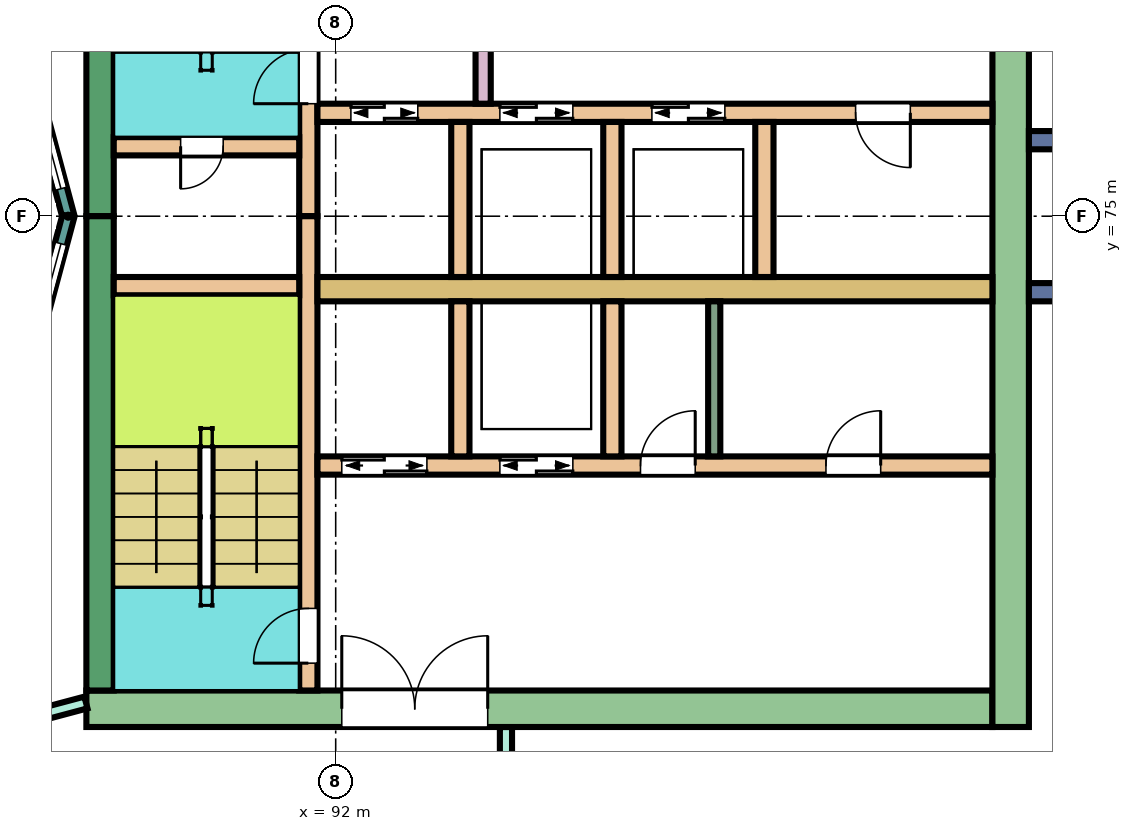
"""IFC4 building model, lengths in metres.
Left out: names, types, materials, properties, quantities, classifications, styles, units other than length and angle.
Written with IfcOpenShell. Run it as: python <this file> out.ifc"""

import sys

from ifc_helpers import new_model, si_unit, direction, frame, frame_2d, origin, place, context, subcontext, project, spatial, rectangle, extrude, element, fill, save


model = new_model("IFC4")
c1 = context("Model", 3, precision=1e-05, world=origin(), true_north=direction((0.0, 1.0)))
c2 = subcontext(c1, "Body", "Model", "MODEL_VIEW")
j1 = project(units=[si_unit("LENGTHUNIT", "METRE"), si_unit("PLANEANGLEUNIT", "RADIAN")], contexts=[c1])
p1 = place(None, origin())
s1 = spatial("IfcSite", under=j1, at=p1, CompositionType="ELEMENT")
p2 = place(p1, origin())
s2 = spatial("IfcBuilding", under=s1, at=p2, CompositionType="ELEMENT")
p3 = place(p2, frame((0.0, 0.0, 270.9)))
s3 = spatial("IfcBuildingStorey", under=s2, at=p3, CompositionType="ELEMENT", Elevation=270.9)
p4 = place(p3, frame((87.9, 66.9, 0.0), z_axis=(0.0, 0.0, 1.0), x_axis=(1.0, 0.0, 0.0)))
e1 = element("IfcWall", 1, at=p4, inside=s3, PredefinedType="SHEAR", context=c2, shape_type="SweptSolid", body=[
    extrude(rectangle(XDim=14.9, YDim=0.6, at=frame_2d((7.45, 0.0))), origin(), (0.0, 0.0, 1.0), 4.48),
])
p5 = place(p4, frame((4.2, 0.0, 0.0)))
e2 = element("IfcOpeningElement", 2, at=p5, cuts=e1, PredefinedType="OPENING", context=c2, shape_type="SweptSolid", body=[
    extrude(rectangle(XDim=2.4, YDim=2.4, at=frame_2d((1.2, 1.2))), frame((0.0, 0.31, 0.0), z_axis=(0.0, -1.0, 0.0), x_axis=(1.0, 0.0, 0.0)), (0.0, 0.0, 1.0), 0.62),
])
for number, where, z_axis, x_axis in (
    (3, (88.125, 75.0, 0.0), (0.0, 0.0, 1.0), (0.0, 1.0, 0.0)),
    (4, (88.125, 67.2, 0.0), (0.0, 0.0, 1.0), (0.0, 1.0, 0.0)),
):
    element("IfcWall", number, at=place(p3, frame(where, z_axis=z_axis, x_axis=x_axis)), inside=s3, PredefinedType="SHEAR", context=c2, shape_type="SweptSolid", body=[
        extrude(rectangle(XDim=7.8, YDim=0.45, at=frame_2d((3.9, 0.0))), origin(), (0.0, 0.0, 1.0), 4.48),
    ])
p6 = place(p3, frame((103.1, 66.6, 0.0), z_axis=(0.0, 0.0, 1.0), x_axis=(0.0, 1.0, 0.0)))
e5 = element("IfcWall", 5, at=p6, inside=s3, PredefinedType="SHEAR", context=c2, shape_type="SweptSolid", body=[
    extrude(rectangle(XDim=16.8, YDim=0.6, at=frame_2d((8.4, 0.0))), origin(), (0.0, 0.0, 1.0), 4.48),
])
p7 = place(p3, frame((91.55, 75.0, 0.0), z_axis=(0.0, 0.0, 1.0), x_axis=(0.0, 1.0, 0.0)))
e6 = element("IfcWall", 6, at=p7, inside=s3, PredefinedType="SHEAR", context=c2, shape_type="SweptSolid", body=[
    extrude(rectangle(XDim=7.8, YDim=0.3, at=frame_2d((3.9, 0.0))), origin(), (0.0, 0.0, 1.0), 4.48),
])
p8 = place(p7, frame((1.85, 0.0, 0.0)))
e7 = element("IfcOpeningElement", 7, at=p8, cuts=e6, PredefinedType="OPENING", context=c2, shape_type="SweptSolid", body=[
    extrude(rectangle(XDim=0.9, YDim=2.1, at=frame_2d((0.45, 1.05))), frame((0.0, 0.16, 0.0), z_axis=(0.0, -1.0, 0.0), x_axis=(1.0, 0.0, 0.0)), (0.0, 0.0, 1.0), 0.32),
])
p9 = place(p3, frame((91.55, 67.2, 0.0), z_axis=(0.0, 0.0, 1.0), x_axis=(0.0, 1.0, 0.0)))
e8 = element("IfcWall", 8, at=p9, inside=s3, PredefinedType="SHEAR", context=c2, shape_type="SweptSolid", body=[
    extrude(rectangle(XDim=7.8, YDim=0.3, at=frame_2d((3.9, 0.0))), origin(), (0.0, 0.0, 1.0), 4.48),
])
p10 = place(p9, frame((0.45, 0.0, 0.0)))
e9 = element("IfcOpeningElement", 9, at=p10, cuts=e8, PredefinedType="OPENING", context=c2, shape_type="SweptSolid", body=[
    extrude(rectangle(XDim=0.9, YDim=2.1, at=frame_2d((0.45, 1.05))), frame((0.0, 0.16, 0.0), z_axis=(0.0, -1.0, 0.0), x_axis=(1.0, 0.0, 0.0)), (0.0, 0.0, 1.0), 0.32),
])
p11 = place(p3, frame((88.35, 76.15, 0.0), z_axis=(0.0, 0.0, 1.0), x_axis=(1.0, 0.0, 0.0)))
e10 = element("IfcWall", 10, at=p11, inside=s3, PredefinedType="SHEAR", context=c2, shape_type="SweptSolid", body=[
    extrude(rectangle(XDim=3.05, YDim=0.3, at=frame_2d((1.525, 0.0))), origin(), (0.0, 0.0, 1.0), 4.48),
])
p12 = place(p11, frame((1.1, 0.0, 0.0)))
e11 = element("IfcOpeningElement", 11, at=p12, cuts=e10, PredefinedType="OPENING", context=c2, shape_type="SweptSolid", body=[
    extrude(rectangle(XDim=0.7, YDim=2.0, at=frame_2d((0.35, 1.0))), frame((0.0, 0.16, 0.0), z_axis=(0.0, -1.0, 0.0), x_axis=(1.0, 0.0, 0.0)), (0.0, 0.0, 1.0), 0.32),
])
p13 = place(p3, frame((88.35, 73.85, 0.0), z_axis=(0.0, 0.0, 1.0), x_axis=(1.0, 0.0, 0.0)))
e12 = element("IfcWall", 12, at=p13, inside=s3, PredefinedType="SHEAR", context=c2, shape_type="SweptSolid", body=[
    extrude(rectangle(XDim=3.05, YDim=0.3, at=frame_2d((1.525, 0.0))), origin(), (0.0, 0.0, 1.0), 4.48),
])
p14 = place(p3, frame((91.7, 76.7, 0.0), z_axis=(0.0, 0.0, 1.0), x_axis=(1.0, 0.0, 0.0)))
e13 = element("IfcWall", 13, at=p14, inside=s3, PredefinedType="SHEAR", context=c2, shape_type="SweptSolid", body=[
    extrude(rectangle(XDim=11.1, YDim=0.3, at=frame_2d((5.55, 0.0))), origin(), (0.0, 0.0, 1.0), 4.48),
])
p15 = place(p14, frame((0.55, 0.0, 0.0)))
e14 = element("IfcOpeningElement", 14, at=p15, cuts=e13, PredefinedType="OPENING", context=c2, shape_type="SweptSolid", body=[
    extrude(rectangle(XDim=1.1, YDim=2.1, at=frame_2d((0.55, 1.05))), frame((0.0, 0.16, 0.0), z_axis=(0.0, -1.0, 0.0), x_axis=(1.0, 0.0, 0.0)), (0.0, 0.0, 1.0), 0.32),
])
p16 = place(p14, frame((3.0, 0.0, 0.0)))
e15 = element("IfcOpeningElement", 15, at=p16, cuts=e13, PredefinedType="OPENING", context=c2, shape_type="SweptSolid", body=[
    extrude(rectangle(XDim=1.2, YDim=2.1, at=frame_2d((0.6, 1.05))), frame((0.0, 0.16, 0.0), z_axis=(0.0, -1.0, 0.0), x_axis=(1.0, 0.0, 0.0)), (0.0, 0.0, 1.0), 0.32),
])
p17 = place(p14, frame((5.5, 0.0, 0.0)))
e16 = element("IfcOpeningElement", 16, at=p17, cuts=e13, PredefinedType="OPENING", context=c2, shape_type="SweptSolid", body=[
    extrude(rectangle(XDim=1.2, YDim=2.1, at=frame_2d((0.6, 1.05))), frame((0.0, 0.16, 0.0), z_axis=(0.0, -1.0, 0.0), x_axis=(1.0, 0.0, 0.0)), (0.0, 0.0, 1.0), 0.32),
])
p18 = place(p14, frame((8.85, 0.0, 0.0)))
e17 = element("IfcOpeningElement", 17, at=p18, cuts=e13, PredefinedType="OPENING", context=c2, shape_type="SweptSolid", body=[
    extrude(rectangle(XDim=0.9, YDim=2.1, at=frame_2d((0.45, 1.05))), frame((0.0, 0.16, 0.0), z_axis=(0.0, -1.0, 0.0), x_axis=(1.0, 0.0, 0.0)), (0.0, 0.0, 1.0), 0.32),
])
p19 = place(p3, frame((91.7, 73.8, 0.0), z_axis=(0.0, 0.0, 1.0), x_axis=(1.0, 0.0, 0.0)))
e18 = element("IfcWall", 18, at=p19, inside=s3, PredefinedType="SHEAR", context=c2, shape_type="SweptSolid", body=[
    extrude(rectangle(XDim=11.1, YDim=0.4, at=frame_2d((5.55, 0.0))), origin(), (0.0, 0.0, 1.0), 4.48),
])
p20 = place(p3, frame((91.7, 70.9, 0.0), z_axis=(0.0, 0.0, 1.0), x_axis=(1.0, 0.0, 0.0)))
e19 = element("IfcWall", 19, at=p20, inside=s3, PredefinedType="SHEAR", context=c2, shape_type="SweptSolid", body=[
    extrude(rectangle(XDim=11.1, YDim=0.3, at=frame_2d((5.55, 0.0))), origin(), (0.0, 0.0, 1.0), 4.48),
])
p21 = place(p20, frame((0.4, 0.0, 0.0)))
e20 = element("IfcOpeningElement", 20, at=p21, cuts=e19, PredefinedType="OPENING", context=c2, shape_type="SweptSolid", body=[
    extrude(rectangle(XDim=1.4, YDim=2.1, at=frame_2d((0.7, 1.05))), frame((0.0, 0.16, 0.0), z_axis=(0.0, -1.0, 0.0), x_axis=(1.0, 0.0, 0.0)), (0.0, 0.0, 1.0), 0.32),
])
p22 = place(p20, frame((3.0, 0.0, 0.0)))
e21 = element("IfcOpeningElement", 21, at=p22, cuts=e19, PredefinedType="OPENING", context=c2, shape_type="SweptSolid", body=[
    extrude(rectangle(XDim=1.2, YDim=2.1, at=frame_2d((0.6, 1.05))), frame((0.0, 0.16, 0.0), z_axis=(0.0, -1.0, 0.0), x_axis=(1.0, 0.0, 0.0)), (0.0, 0.0, 1.0), 0.32),
])
p23 = place(p20, frame((5.312, 0.0, 0.0)))
e22 = element("IfcOpeningElement", 22, at=p23, cuts=e19, PredefinedType="OPENING", context=c2, shape_type="SweptSolid", body=[
    extrude(rectangle(XDim=0.9, YDim=2.1, at=frame_2d((0.45, 1.05))), frame((0.0, 0.16, 0.0), z_axis=(0.0, -1.0, 0.0), x_axis=(1.0, 0.0, 0.0)), (0.0, 0.0, 1.0), 0.32),
])
p24 = place(p20, frame((8.363, 0.0, 0.0)))
e23 = element("IfcOpeningElement", 23, at=p24, cuts=e19, PredefinedType="OPENING", context=c2, shape_type="SweptSolid", body=[
    extrude(rectangle(XDim=0.9, YDim=2.1, at=frame_2d((0.45, 1.05))), frame((0.0, 0.16, 0.0), z_axis=(0.0, -1.0, 0.0), x_axis=(1.0, 0.0, 0.0)), (0.0, 0.0, 1.0), 0.32),
])
for number, where, z_axis, x_axis in (
    (24, (94.05, 74.0, 0.0), (0.0, 0.0, 1.0), (0.0, 1.0, 0.0)),
    (25, (96.55, 74.0, 0.0), (0.0, 0.0, 1.0), (0.0, 1.0, 0.0)),
    (26, (99.05, 74.0, 0.0), (0.0, 0.0, 1.0), (0.0, 1.0, 0.0)),
    (27, (94.05, 71.05, 0.0), (0.0, 0.0, 1.0), (0.0, 1.0, 0.0)),
    (28, (96.55, 71.05, 0.0), (0.0, 0.0, 1.0), (0.0, 1.0, 0.0)),
):
    element("IfcWall", number, at=place(p3, frame(where, z_axis=z_axis, x_axis=x_axis)), inside=s3, PredefinedType="SHEAR", context=c2, shape_type="SweptSolid", body=[
        extrude(rectangle(XDim=2.55, YDim=0.3, at=frame_2d((1.275, 0.0))), origin(), (0.0, 0.0, 1.0), 4.48),
    ])
p25 = place(p3, frame((94.425, 76.85, 0.0), z_axis=(0.0, 0.0, 1.0), x_axis=(0.0, 1.0, 0.0)))
e29 = element("IfcWall", 29, at=p25, inside=s3, PredefinedType="SHEAR", context=c2, shape_type="SweptSolid", body=[
    extrude(rectangle(XDim=1.5, YDim=0.25, at=frame_2d((0.75, 0.0))), origin(), (0.0, 0.0, 1.0), 4.48),
])
for number, where, z_axis, x_axis in (
    (30, (103.4, 73.75, 0.0), (0.0, 0.0, 1.0), (1.0, 0.0, 0.0)),
    (31, (103.4, 76.25, 0.0), (0.0, 0.0, 1.0), (1.0, 0.0, 0.0)),
):
    element("IfcWall", number, at=place(p3, frame(where, z_axis=z_axis, x_axis=x_axis)), inside=s3, PredefinedType="NOTDEFINED", context=c2, shape_type="SweptSolid", body=[
        extrude(rectangle(XDim=2.416, YDim=0.3, at=frame_2d((1.208, 0.0))), origin(), (0.0, 0.0, 1.0), 4.8),
    ])
p26 = place(p3, frame((87.604, 75.0, 0.0), z_axis=(0.0, 0.0, 1.0), x_axis=(-0.258789828301, 0.965933654434, 0.0)))
e32 = element("IfcWall", 32, at=p26, inside=s3, PredefinedType="NOTDEFINED", context=c2, shape_type="SweptSolid", body=[
    extrude(rectangle(XDim=3.936, YDim=0.2, at=frame_2d((1.968, 0.0))), origin(), (0.0, 0.0, 1.0), 4.8),
])
p27 = place(p26, frame((0.468, 0.0, 0.9)))
e33 = element("IfcOpeningElement", 33, at=p27, cuts=e32, PredefinedType="OPENING", context=c2, shape_type="SweptSolid", body=[
    extrude(rectangle(XDim=3.0, YDim=2.3, at=frame_2d((1.5, 1.15))), frame((0.0, 0.11, 0.0), z_axis=(0.0, -1.0, 0.0), x_axis=(1.0, 0.0, 0.0)), (0.0, 0.0, 1.0), 0.22),
])
p28 = place(p3, frame((86.585, 71.198, 0.0), z_axis=(0.0, 0.0, 1.0), x_axis=(0.258789828301, 0.965933654434, 0.0)))
e34 = element("IfcWall", 34, at=p28, inside=s3, PredefinedType="NOTDEFINED", context=c2, shape_type="SweptSolid", body=[
    extrude(rectangle(XDim=3.936, YDim=0.2, at=frame_2d((1.968, 0.0))), origin(), (0.0, 0.0, 1.0), 4.8),
])
p29 = place(p28, frame((0.468, 0.0, 0.9)))
e35 = element("IfcOpeningElement", 35, at=p29, cuts=e34, PredefinedType="OPENING", context=c2, shape_type="SweptSolid", body=[
    extrude(rectangle(XDim=3.0, YDim=2.3, at=frame_2d((1.5, 1.15))), frame((0.0, 0.11, 0.0), z_axis=(0.0, -1.0, 0.0), x_axis=(1.0, 0.0, 0.0)), (0.0, 0.0, 1.0), 0.22),
])
p30 = place(p3, frame((80.125, 64.932, 0.0), z_axis=(0.0, 0.0, 1.0), x_axis=(0.966236955806, 0.257655089674, 0.0)))
e36 = element("IfcWall", 36, at=p30, inside=s3, PredefinedType="PARTITIONING", context=c2, shape_type="SweptSolid", body=[
    extrude(rectangle(XDim=8.039, YDim=0.2, at=frame_2d((4.02, 0.0))), origin(), (0.0, 0.0, 1.0), 4.35),
])
p31 = place(p30, frame((6.298, 0.0, 0.0)))
e37 = element("IfcOpeningElement", 37, at=p31, cuts=e36, PredefinedType="OPENING", context=c2, shape_type="SweptSolid", body=[
    extrude(rectangle(XDim=0.9, YDim=2.1, at=frame_2d((0.45, 1.05))), frame((0.0, 0.11, 0.0), z_axis=(0.0, -1.0, 0.0), x_axis=(1.0, 0.0, 0.0)), (0.0, 0.0, 1.0), 0.22),
])
p32 = place(p30, frame((2.045, 0.0, 0.0)))
e38 = element("IfcOpeningElement", 38, at=p32, cuts=e36, PredefinedType="OPENING", context=c2, shape_type="SweptSolid", body=[
    extrude(rectangle(XDim=0.9, YDim=2.1, at=frame_2d((0.45, 1.05))), frame((0.0, 0.11, 0.0), z_axis=(0.0, -1.0, 0.0), x_axis=(1.0, 0.0, 0.0)), (0.0, 0.0, 1.0), 0.22),
])
p33 = place(p3, frame((94.8, 65.1, 0.0), z_axis=(0.0, 0.0, 1.0), x_axis=(0.0, 1.0, 0.0)))
e39 = element("IfcWall", 39, at=p33, inside=s3, PredefinedType="PARTITIONING", context=c2, shape_type="SweptSolid", body=[
    extrude(rectangle(XDim=1.499, YDim=0.2, at=frame_2d((0.75, 0.0))), origin(), (0.0, 0.0, 1.0), 4.35),
])
p34 = place(p3, frame((98.225, 71.05, 0.0), z_axis=(0.0, 0.0, 1.0), x_axis=(0.0, 1.0, 0.0)))
e40 = element("IfcWall", 40, at=p34, inside=s3, PredefinedType="PARTITIONING", context=c2, shape_type="SweptSolid", body=[
    extrude(rectangle(XDim=2.55, YDim=0.2, at=frame_2d((1.275, 0.0))), origin(), (0.0, 0.0, 1.0), 4.48),
])
p35 = place(p27, origin())
e41 = element("IfcWindow", 41, at=p35, inside=s3, PartitioningType="SINGLE_PANEL", PredefinedType="WINDOW", context=c2, shape_type="SweptSolid", body=[
    extrude(rectangle(XDim=3.0, YDim=2.3, at=frame_2d((1.5, 1.15))), frame((0.0, 0.03, 0.0), z_axis=(0.0, -1.0, 0.0), x_axis=(1.0, 0.0, 0.0)), (0.0, 0.0, 1.0), 0.06),
])
fill(e33, e41)
p36 = place(p29, origin())
e42 = element("IfcWindow", 42, at=p36, inside=s3, PartitioningType="SINGLE_PANEL", PredefinedType="WINDOW", context=c2, shape_type="SweptSolid", body=[
    extrude(rectangle(XDim=3.0, YDim=2.3, at=frame_2d((1.5, 1.15))), frame((0.0, 0.03, 0.0), z_axis=(0.0, -1.0, 0.0), x_axis=(1.0, 0.0, 0.0)), (0.0, 0.0, 1.0), 0.06),
])
fill(e35, e42)
p37 = place(p12, frame((0.7, 0.0, 0.0), z_axis=(0.0, 0.0, 1.0), x_axis=(-1.0, 0.0, 0.0)))
e43 = element("IfcDoor", 43, at=p37, inside=s3, OperationType="SINGLE_SWING_RIGHT", PredefinedType="DOOR", context=c2, shape_type="SweptSolid", body=[
    extrude(rectangle(XDim=0.7, YDim=2.0, at=frame_2d((0.35, 1.0))), frame((0.0, 0.025, 0.0), z_axis=(0.0, -1.0, 0.0), x_axis=(1.0, 0.0, 0.0)), (0.0, 0.0, 1.0), 0.05),
])
fill(e11, e43)
p38 = place(p8, origin())
e44 = element("IfcDoor", 44, at=p38, inside=s3, OperationType="SINGLE_SWING_LEFT", PredefinedType="DOOR", context=c2, shape_type="SweptSolid", body=[
    extrude(rectangle(XDim=0.9, YDim=2.1, at=frame_2d((0.45, 1.05))), frame((0.0, 0.025, 0.0), z_axis=(0.0, -1.0, 0.0), x_axis=(1.0, 0.0, 0.0)), (0.0, 0.0, 1.0), 0.05),
])
fill(e7, e44)
p39 = place(p10, origin())
e45 = element("IfcDoor", 45, at=p39, inside=s3, OperationType="SINGLE_SWING_LEFT", PredefinedType="DOOR", context=c2, shape_type="SweptSolid", body=[
    extrude(rectangle(XDim=0.9, YDim=2.1, at=frame_2d((0.45, 1.05))), frame((0.0, 0.025, 0.0), z_axis=(0.0, -1.0, 0.0), x_axis=(1.0, 0.0, 0.0)), (0.0, 0.0, 1.0), 0.05),
])
fill(e9, e45)
p40 = place(p15, origin())
e46 = element("IfcDoor", 46, at=p40, inside=s3, OperationType="DOUBLE_DOOR_SLIDING", PredefinedType="DOOR", context=c2, shape_type="SweptSolid", body=[
    extrude(rectangle(XDim=1.1, YDim=2.1, at=frame_2d((0.55, 1.05))), frame((0.0, 0.025, 0.0), z_axis=(0.0, -1.0, 0.0), x_axis=(1.0, 0.0, 0.0)), (0.0, 0.0, 1.0), 0.05),
])
fill(e14, e46)
p41 = place(p16, origin())
e47 = element("IfcDoor", 47, at=p41, inside=s3, OperationType="DOUBLE_DOOR_SLIDING", PredefinedType="DOOR", context=c2, shape_type="SweptSolid", body=[
    extrude(rectangle(XDim=1.2, YDim=2.1, at=frame_2d((0.6, 1.05))), frame((0.0, 0.025, 0.0), z_axis=(0.0, -1.0, 0.0), x_axis=(1.0, 0.0, 0.0)), (0.0, 0.0, 1.0), 0.05),
])
fill(e15, e47)
p42 = place(p17, origin())
e48 = element("IfcDoor", 48, at=p42, inside=s3, OperationType="DOUBLE_DOOR_SLIDING", PredefinedType="DOOR", context=c2, shape_type="SweptSolid", body=[
    extrude(rectangle(XDim=1.2, YDim=2.1, at=frame_2d((0.6, 1.05))), frame((0.0, 0.025, 0.0), z_axis=(0.0, -1.0, 0.0), x_axis=(1.0, 0.0, 0.0)), (0.0, 0.0, 1.0), 0.05),
])
fill(e16, e48)
p43 = place(p18, frame((0.9, 0.0, 0.0), z_axis=(0.0, 0.0, 1.0), x_axis=(-1.0, 0.0, 0.0)))
e49 = element("IfcDoor", 49, at=p43, inside=s3, OperationType="SINGLE_SWING_LEFT", PredefinedType="DOOR", context=c2, shape_type="SweptSolid", body=[
    extrude(rectangle(XDim=0.9, YDim=2.1, at=frame_2d((0.45, 1.05))), frame((0.0, 0.025, 0.0), z_axis=(0.0, -1.0, 0.0), x_axis=(1.0, 0.0, 0.0)), (0.0, 0.0, 1.0), 0.05),
])
fill(e17, e49)
p44 = place(p21, origin())
e50 = element("IfcDoor", 50, at=p44, inside=s3, OperationType="DOUBLE_DOOR_SLIDING", PredefinedType="DOOR", context=c2, shape_type="SweptSolid", body=[
    extrude(rectangle(XDim=1.4, YDim=2.1, at=frame_2d((0.7, 1.05))), frame((0.0, 0.025, 0.0), z_axis=(0.0, -1.0, 0.0), x_axis=(1.0, 0.0, 0.0)), (0.0, 0.0, 1.0), 0.05),
])
fill(e20, e50)
p45 = place(p22, origin())
e51 = element("IfcDoor", 51, at=p45, inside=s3, OperationType="DOUBLE_DOOR_SLIDING", PredefinedType="DOOR", context=c2, shape_type="SweptSolid", body=[
    extrude(rectangle(XDim=1.2, YDim=2.1, at=frame_2d((0.6, 1.05))), frame((0.0, 0.025, 0.0), z_axis=(0.0, -1.0, 0.0), x_axis=(1.0, 0.0, 0.0)), (0.0, 0.0, 1.0), 0.05),
])
fill(e21, e51)
p46 = place(p23, origin())
e52 = element("IfcDoor", 52, at=p46, inside=s3, OperationType="SINGLE_SWING_RIGHT", PredefinedType="DOOR", context=c2, shape_type="SweptSolid", body=[
    extrude(rectangle(XDim=0.9, YDim=2.1, at=frame_2d((0.45, 1.05))), frame((0.0, 0.025, 0.0), z_axis=(0.0, -1.0, 0.0), x_axis=(1.0, 0.0, 0.0)), (0.0, 0.0, 1.0), 0.05),
])
fill(e22, e52)
p47 = place(p24, origin())
e53 = element("IfcDoor", 53, at=p47, inside=s3, OperationType="SINGLE_SWING_RIGHT", PredefinedType="DOOR", context=c2, shape_type="SweptSolid", body=[
    extrude(rectangle(XDim=0.9, YDim=2.1, at=frame_2d((0.45, 1.05))), frame((0.0, 0.025, 0.0), z_axis=(0.0, -1.0, 0.0), x_axis=(1.0, 0.0, 0.0)), (0.0, 0.0, 1.0), 0.05),
])
fill(e23, e53)
p48 = place(p5, origin())
e54 = element("IfcDoor", 54, at=p48, inside=s3, OperationType="DOUBLE_DOOR_SINGLE_SWING", PredefinedType="DOOR", context=c2, shape_type="SweptSolid", body=[
    extrude(rectangle(XDim=2.4, YDim=2.4, at=frame_2d((1.2, 1.2))), frame((0.0, 0.025, 0.0), z_axis=(0.0, -1.0, 0.0), x_axis=(1.0, 0.0, 0.0)), (0.0, 0.0, 1.0), 0.05),
])
fill(e2, e54)
save(model, sys.argv[1])
